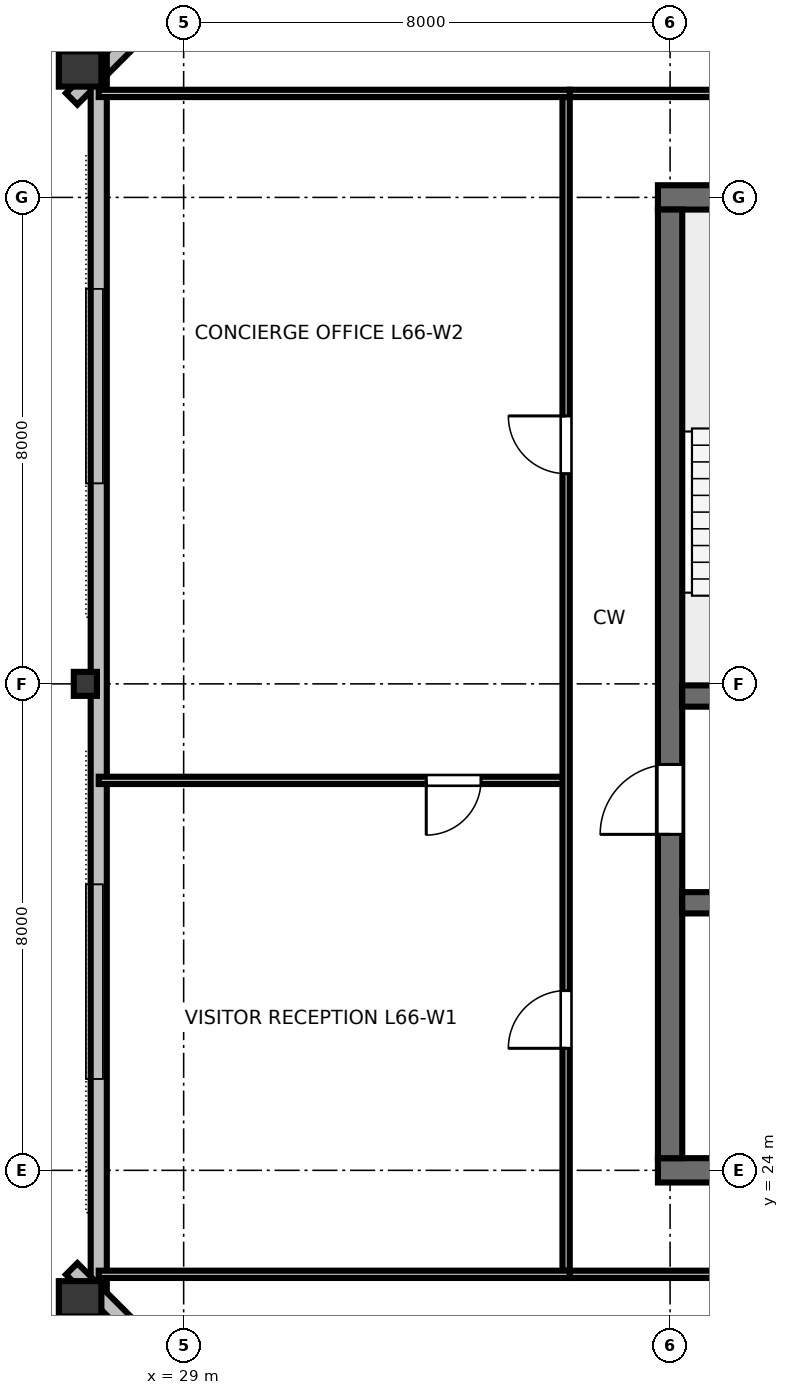
"""IFC4 building model, lengths in metres.
Left out: names, types, materials, properties, quantities, classifications, styles, units other than length and angle.
Written with IfcOpenShell. Run it as: python <this file> out.ifc"""

import sys

from ifc_helpers import new_model, si_unit, direction, frame, frame_2d, origin, origin_2d, place, context, subcontext, project, spatial, rectangle, hollow_rectangle, i_section, extrude, element, fill, save


model = new_model("IFC4")
c1 = context("Model", 3, precision=1e-05, world=origin(), true_north=direction((0.0, 1.0)))
c2 = subcontext(c1, "Body", "Model", "MODEL_VIEW")
j1 = project(units=[si_unit("LENGTHUNIT", "METRE"), si_unit("PLANEANGLEUNIT", "RADIAN")], contexts=[c1])
p1 = place(None, origin())
s1 = spatial("IfcSite", under=j1, at=p1, CompositionType="ELEMENT")
p2 = place(p1, origin())
s2 = spatial("IfcBuilding", under=s1, at=p2, CompositionType="ELEMENT")
p3 = place(p2, frame((0.0, 0.0, 250.2)))
s3 = spatial("IfcBuildingStorey", under=s2, at=p3, CompositionType="ELEMENT", Elevation=250.2)
p4 = place(p3, frame((36.8, 24.0, 0.0), z_axis=(0.0, 0.0, 1.0), x_axis=(1.0, 0.0, 0.0)))
e1 = element("IfcWall", 1, at=p4, inside=s3, PredefinedType="SHEAR", context=c2, shape_type="SweptSolid", body=[
    extrude(rectangle(XDim=18.4, YDim=0.4, at=frame_2d((9.2, 0.0))), origin(), (0.0, 0.0, 1.0), 3.36),
])
p5 = place(p4, frame((13.4, 0.0, 0.0)))
e2 = element("IfcOpeningElement", 2, at=p5, cuts=e1, PredefinedType="OPENING", context=c2, shape_type="SweptSolid", body=[
    extrude(rectangle(XDim=1.6, YDim=2.15, at=frame_2d((0.8, 1.075))), frame((0.0, 0.21, 0.0), z_axis=(0.0, -1.0, 0.0), x_axis=(1.0, 0.0, 0.0)), (0.0, 0.0, 1.0), 0.42),
])
p6 = place(p3, frame((36.8, 40.0, 0.0), z_axis=(0.0, 0.0, 1.0), x_axis=(1.0, 0.0, 0.0)))
e3 = element("IfcWall", 3, at=p6, inside=s3, PredefinedType="SHEAR", context=c2, shape_type="SweptSolid", body=[
    extrude(rectangle(XDim=18.4, YDim=0.4, at=frame_2d((9.2, 0.0))), origin(), (0.0, 0.0, 1.0), 3.36),
])
p7 = place(p6, frame((8.7, 0.0, 0.0)))
e4 = element("IfcOpeningElement", 4, at=p7, cuts=e3, PredefinedType="OPENING", context=c2, shape_type="SweptSolid", body=[
    extrude(rectangle(XDim=1.0, YDim=2.15, at=frame_2d((0.5, 1.075))), frame((0.0, 0.21, 0.0), z_axis=(0.0, -1.0, 0.0), x_axis=(1.0, 0.0, 0.0)), (0.0, 0.0, 1.0), 0.42),
])
p8 = place(p3, frame((37.0, 24.2, 0.0), z_axis=(0.0, 0.0, 1.0), x_axis=(0.0, 1.0, 0.0)))
e5 = element("IfcWall", 5, at=p8, inside=s3, PredefinedType="SHEAR", context=c2, shape_type="SweptSolid", body=[
    extrude(rectangle(XDim=15.6, YDim=0.4, at=frame_2d((7.8, 0.0))), origin(), (0.0, 0.0, 1.0), 3.36),
])
p9 = place(p8, frame((5.325, 0.0, 0.0)))
e6 = element("IfcOpeningElement", 6, at=p9, cuts=e5, PredefinedType="OPENING", context=c2, shape_type="SweptSolid", body=[
    extrude(rectangle(XDim=1.15, YDim=2.15, at=frame_2d((0.575, 1.075))), frame((0.0, 0.21, 0.0), z_axis=(0.0, -1.0, 0.0), x_axis=(1.0, 0.0, 0.0)), (0.0, 0.0, 1.0), 0.42),
])
p10 = place(p3, frame((37.2, 31.8, 0.0), z_axis=(0.0, 0.0, 1.0), x_axis=(1.0, 0.0, 0.0)))
e7 = element("IfcWall", 7, at=p10, inside=s3, PredefinedType="SHEAR", context=c2, shape_type="SweptSolid", body=[
    extrude(rectangle(XDim=17.6, YDim=0.35, at=frame_2d((8.8, 0.0))), origin(), (0.0, 0.0, 1.0), 3.36),
])
p11 = place(p10, frame((0.85, 0.0, 0.0)))
e8 = element("IfcOpeningElement", 8, at=p11, cuts=e7, PredefinedType="OPENING", context=c2, shape_type="SweptSolid", body=[
    extrude(rectangle(XDim=1.1, YDim=2.15, at=frame_2d((0.55, 1.075))), frame((0.0, 0.185, 0.0), z_axis=(0.0, -1.0, 0.0), x_axis=(1.0, 0.0, 0.0)), (0.0, 0.0, 1.0), 0.37),
])
p12 = place(p10, frame((14.75, 0.0, 0.0)))
e9 = element("IfcOpeningElement", 9, at=p12, cuts=e7, PredefinedType="OPENING", context=c2, shape_type="SweptSolid", body=[
    extrude(rectangle(XDim=1.1, YDim=2.15, at=frame_2d((0.55, 1.075))), frame((0.0, 0.185, 0.0), z_axis=(0.0, -1.0, 0.0), x_axis=(1.0, 0.0, 0.0)), (0.0, 0.0, 1.0), 0.37),
])
p13 = place(p3, frame((37.2, 28.4, 0.0), z_axis=(0.0, 0.0, 1.0), x_axis=(1.0, 0.0, 0.0)))
e10 = element("IfcWall", 10, at=p13, inside=s3, PredefinedType="SHEAR", context=c2, shape_type="SweptSolid", body=[
    extrude(rectangle(XDim=17.6, YDim=0.35, at=frame_2d((8.8, 0.0))), origin(), (0.0, 0.0, 1.0), 3.36),
])
p14 = place(p3, frame((27.297, 42.112, 0.0), z_axis=(0.0, 0.0, 1.0), x_axis=(0.0, 1.0, 0.0)))
e11 = element("IfcColumn", 11, at=p14, inside=s3, PredefinedType="COLUMN", context=c2, shape_type="SweptSolid", body=[
    extrude(hollow_rectangle(XDim=0.58, YDim=0.7, WallThickness=0.032, at=origin_2d()), origin(), (0.0, 0.0, 1.0), 3.373),
])
p15 = place(p3, frame((27.384, 32.0, 0.0), z_axis=(0.0, 0.0, 1.0), x_axis=(0.0, 1.0, 0.0)))
e12 = element("IfcColumn", 12, at=p15, inside=s3, PredefinedType="COLUMN", context=c2, shape_type="SweptSolid", body=[
    extrude(i_section(OverallWidth=0.395, OverallDepth=0.38, WebThickness=0.019, FlangeThickness=0.03, FilletRadius=0.025, at=origin_2d()), origin(), (0.0, 0.0, 1.0), 3.373),
])
p16 = place(p3, frame((27.297, 21.888, 0.0), z_axis=(0.0, 0.0, 1.0), x_axis=(0.0, 1.0, 0.0)))
e13 = element("IfcColumn", 13, at=p16, inside=s3, PredefinedType="COLUMN", context=c2, shape_type="SweptSolid", body=[
    extrude(hollow_rectangle(XDim=0.58, YDim=0.7, WallThickness=0.032, at=origin_2d()), origin(), (0.0, 0.0, 1.0), 3.373),
])
p17 = place(p3, frame((34.807, 49.269, 0.0), z_axis=(0.0, 0.0, 1.0), x_axis=(-0.707106781187, -0.707106781187, 0.0)))
e14 = element("IfcWall", 14, at=p17, inside=s3, PredefinedType="STANDARD", context=c2, shape_type="SweptSolid", body=[
    extrude(rectangle(XDim=10.816, YDim=0.265, at=frame_2d((5.408, 0.0))), origin(), (0.0, 0.0, 1.0), 2.832),
])
p18 = place(p3, frame((27.604, 42.695, 0.0), z_axis=(0.0, 0.0, 1.0), x_axis=(0.0, -1.0, 0.0)))
e15 = element("IfcWall", 15, at=p18, inside=s3, PredefinedType="STANDARD", context=c2, shape_type="SweptSolid", body=[
    extrude(rectangle(XDim=21.389, YDim=0.265, at=frame_2d((10.695, 0.0))), origin(), (0.0, 0.0, 1.0), 2.832),
])
p19 = place(p3, frame((27.159, 22.38, 0.0), z_axis=(0.0, 0.0, 1.0), x_axis=(0.707106781187, -0.707106781187, 0.0)))
e16 = element("IfcWall", 16, at=p19, inside=s3, PredefinedType="STANDARD", context=c2, shape_type="SweptSolid", body=[
    extrude(rectangle(XDim=10.816, YDim=0.265, at=frame_2d((5.408, 0.0))), origin(), (0.0, 0.0, 1.0), 2.832),
])
p20 = place(p3, frame((35.35, 22.29, 0.0), z_axis=(0.0, 0.0, 1.0), x_axis=(1.0, 0.0, 0.0)))
e17 = element("IfcWall", 17, at=p20, inside=s3, PredefinedType="PARTITIONING", context=c2, shape_type="SweptSolid", body=[
    extrude(rectangle(XDim=9.93, YDim=0.12, at=frame_2d((4.965, 0.0))), origin(), (0.0, 0.0, 1.0), 2.655),
])
p21 = place(p20, frame((3.767, 0.0, 0.0)))
e18 = element("IfcOpeningElement", 18, at=p21, cuts=e17, PredefinedType="OPENING", context=c2, shape_type="SweptSolid", body=[
    extrude(rectangle(XDim=0.95, YDim=2.15, at=frame_2d((0.475, 1.075))), frame((0.0, 0.07, 0.0), z_axis=(0.0, -1.0, 0.0), x_axis=(1.0, 0.0, 0.0)), (0.0, 0.0, 1.0), 0.14),
])
p22 = place(p3, frame((35.35, 41.71, 0.0), z_axis=(0.0, 0.0, 1.0), x_axis=(1.0, 0.0, 0.0)))
e19 = element("IfcWall", 19, at=p22, inside=s3, PredefinedType="PARTITIONING", context=c2, shape_type="SweptSolid", body=[
    extrude(rectangle(XDim=21.3, YDim=0.12, at=frame_2d((10.65, 0.0))), origin(), (0.0, 0.0, 1.0), 2.655),
])
p23 = place(p22, frame((3.472, 0.0, 0.0)))
e20 = element("IfcOpeningElement", 20, at=p23, cuts=e19, PredefinedType="OPENING", context=c2, shape_type="SweptSolid", body=[
    extrude(rectangle(XDim=0.95, YDim=2.15, at=frame_2d((0.475, 1.075))), frame((0.0, 0.07, 0.0), z_axis=(0.0, -1.0, 0.0), x_axis=(1.0, 0.0, 0.0)), (0.0, 0.0, 1.0), 0.14),
])
p24 = place(p22, frame((12.975, 0.0, 0.0)))
e21 = element("IfcOpeningElement", 21, at=p24, cuts=e19, PredefinedType="OPENING", context=c2, shape_type="SweptSolid", body=[
    extrude(rectangle(XDim=0.95, YDim=2.15, at=frame_2d((0.475, 1.075))), frame((0.0, 0.07, 0.0), z_axis=(0.0, -1.0, 0.0), x_axis=(1.0, 0.0, 0.0)), (0.0, 0.0, 1.0), 0.14),
])
p25 = place(p22, frame((17.735, 0.0, 0.0)))
e22 = element("IfcOpeningElement", 22, at=p25, cuts=e19, PredefinedType="OPENING", context=c2, shape_type="SweptSolid", body=[
    extrude(rectangle(XDim=0.95, YDim=2.15, at=frame_2d((0.475, 1.075))), frame((0.0, 0.07, 0.0), z_axis=(0.0, -1.0, 0.0), x_axis=(1.0, 0.0, 0.0)), (0.0, 0.0, 1.0), 0.14),
])
p26 = place(p3, frame((35.29, 30.413, 0.0), z_axis=(0.0, 0.0, 1.0), x_axis=(-1.0, 0.0, 0.0)))
e23 = element("IfcWall", 23, at=p26, inside=s3, PredefinedType="PARTITIONING", context=c2, shape_type="SweptSolid", body=[
    extrude(rectangle(XDim=7.687, YDim=0.12, at=frame_2d((3.843, 0.0))), origin(), (0.0, 0.0, 1.0), 2.655),
])
p27 = place(p26, frame((1.4, 0.0, 0.0)))
e24 = element("IfcOpeningElement", 24, at=p27, cuts=e23, PredefinedType="OPENING", context=c2, shape_type="SweptSolid", body=[
    extrude(rectangle(XDim=0.9, YDim=2.15, at=frame_2d((0.45, 1.075))), frame((0.0, 0.07, 0.0), z_axis=(0.0, -1.0, 0.0), x_axis=(1.0, 0.0, 0.0)), (0.0, 0.0, 1.0), 0.14),
])
p28 = place(p3, frame((35.29, 22.35, 0.0), z_axis=(0.0, 0.0, 1.0), x_axis=(0.0, 1.0, 0.0)))
e25 = element("IfcWall", 25, at=p28, inside=s3, PredefinedType="PARTITIONING", context=c2, shape_type="SweptSolid", body=[
    extrude(rectangle(XDim=19.3, YDim=0.12, at=frame_2d((9.65, 0.0))), origin(), (0.0, 0.0, 1.0), 2.655),
])
p29 = place(p28, frame((3.656, 0.0, 0.0)))
e26 = element("IfcOpeningElement", 26, at=p29, cuts=e25, PredefinedType="OPENING", context=c2, shape_type="SweptSolid", body=[
    extrude(rectangle(XDim=0.95, YDim=2.15, at=frame_2d((0.475, 1.075))), frame((0.0, 0.07, 0.0), z_axis=(0.0, -1.0, 0.0), x_axis=(1.0, 0.0, 0.0)), (0.0, 0.0, 1.0), 0.14),
])
p30 = place(p28, frame((13.106, 0.0, 0.0)))
e27 = element("IfcOpeningElement", 27, at=p30, cuts=e25, PredefinedType="OPENING", context=c2, shape_type="SweptSolid", body=[
    extrude(rectangle(XDim=0.95, YDim=2.15, at=frame_2d((0.475, 1.075))), frame((0.0, 0.07, 0.0), z_axis=(0.0, -1.0, 0.0), x_axis=(1.0, 0.0, 0.0)), (0.0, 0.0, 1.0), 0.14),
])
for number, where, z_axis, x_axis in (
    (28, (35.35, 22.29, 0.0), (0.0, 0.0, 1.0), (-1.0, 0.0, 0.0)),
    (29, (35.35, 41.71, 0.0), (0.0, 0.0, 1.0), (-1.0, 0.0, 0.0)),
):
    element("IfcWall", number, at=place(p3, frame(where, z_axis=z_axis, x_axis=x_axis)), inside=s3, PredefinedType="PARTITIONING", context=c2, shape_type="SweptSolid", body=[
        extrude(rectangle(XDim=7.747, YDim=0.12, at=frame_2d((3.873, 0.0))), origin(), (0.0, 0.0, 1.0), 2.655),
    ])
p31 = place(p9, origin())
e30 = element("IfcDoor", 30, at=p31, inside=s3, OperationType="SINGLE_SWING_LEFT", PredefinedType="DOOR", context=c2, shape_type="SweptSolid", body=[
    extrude(rectangle(XDim=1.15, YDim=2.15, at=frame_2d((0.575, 1.075))), frame((0.0, 0.025, 0.0), z_axis=(0.0, -1.0, 0.0), x_axis=(1.0, 0.0, 0.0)), (0.0, 0.0, 1.0), 0.05),
])
fill(e6, e30)
p32 = place(p27, origin())
e31 = element("IfcDoor", 31, at=p32, inside=s3, OperationType="SINGLE_SWING_RIGHT", PredefinedType="DOOR", context=c2, shape_type="SweptSolid", body=[
    extrude(rectangle(XDim=0.9, YDim=2.15, at=frame_2d((0.45, 1.075))), frame((0.0, 0.025, 0.0), z_axis=(0.0, -1.0, 0.0), x_axis=(1.0, 0.0, 0.0)), (0.0, 0.0, 1.0), 0.05),
])
fill(e24, e31)
p33 = place(p29, origin())
e32 = element("IfcDoor", 32, at=p33, inside=s3, OperationType="SINGLE_SWING_LEFT", PredefinedType="DOOR", context=c2, shape_type="SweptSolid", body=[
    extrude(rectangle(XDim=0.95, YDim=2.15, at=frame_2d((0.475, 1.075))), frame((0.0, 0.025, 0.0), z_axis=(0.0, -1.0, 0.0), x_axis=(1.0, 0.0, 0.0)), (0.0, 0.0, 1.0), 0.05),
])
fill(e26, e32)
p34 = place(p30, origin())
e33 = element("IfcDoor", 33, at=p34, inside=s3, OperationType="SINGLE_SWING_RIGHT", PredefinedType="DOOR", context=c2, shape_type="SweptSolid", body=[
    extrude(rectangle(XDim=0.95, YDim=2.15, at=frame_2d((0.475, 1.075))), frame((0.0, 0.025, 0.0), z_axis=(0.0, -1.0, 0.0), x_axis=(1.0, 0.0, 0.0)), (0.0, 0.0, 1.0), 0.05),
])
fill(e27, e33)
save(model, sys.argv[1])
